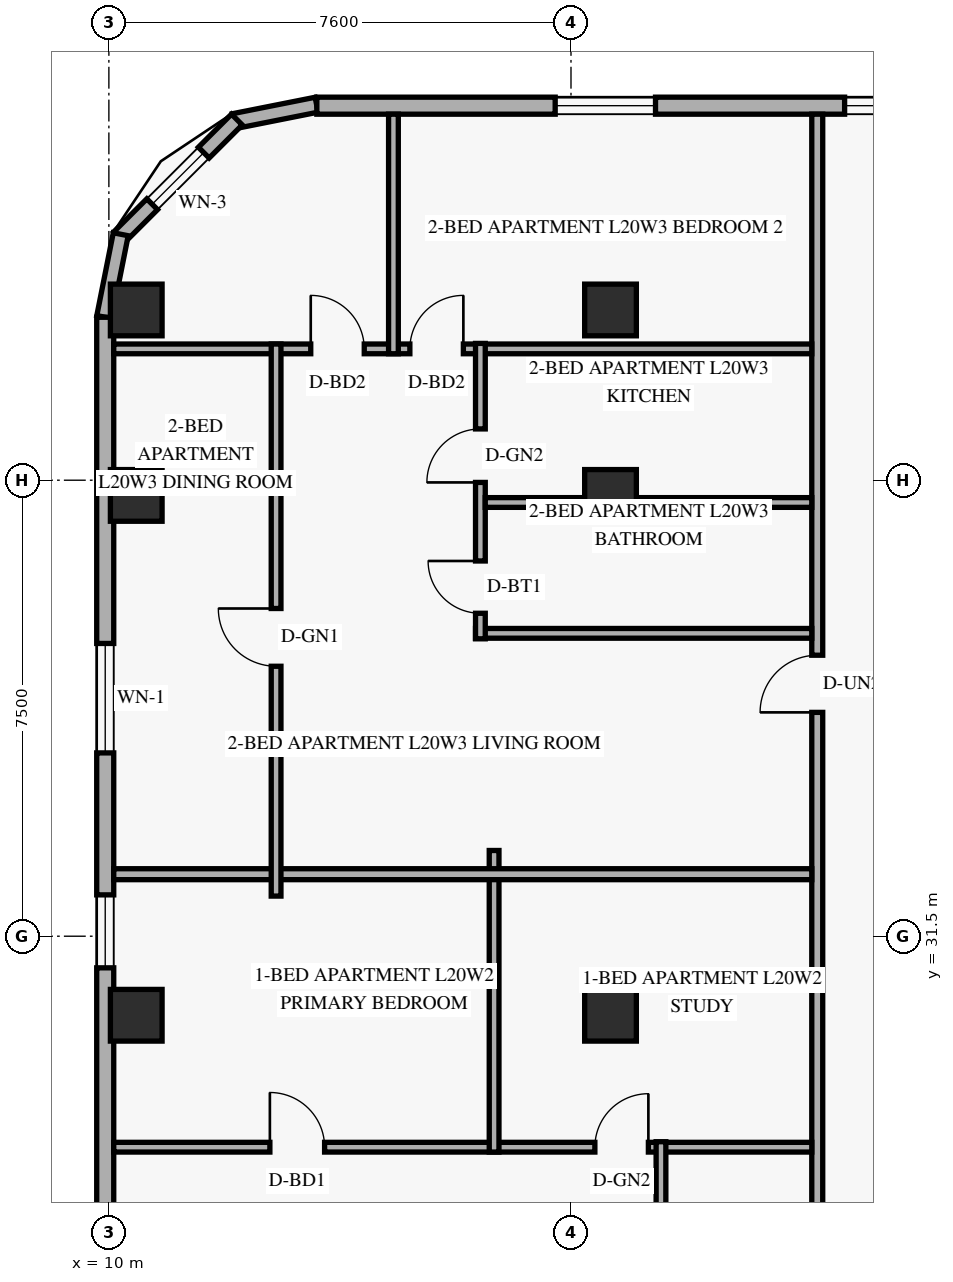
"""IFC4 building model, lengths in metres.
Left out: names, types, materials, properties, quantities, classifications, styles, units other than length and angle.
Written with IfcOpenShell. Run it as: python <this file> out.ifc"""

import sys

from ifc_helpers import new_model, si_unit, direction, frame, frame_2d, origin, origin_2d, place, context, subcontext, project, spatial, rectangle, extrude, element, fill, save


model = new_model("IFC4")
c1 = context("Model", 3, precision=1e-05, world=origin(), true_north=direction((0.0, 1.0)))
c2 = subcontext(c1, "Body", "Model", "MODEL_VIEW")
j1 = project(units=[si_unit("LENGTHUNIT", "METRE"), si_unit("PLANEANGLEUNIT", "RADIAN")], contexts=[c1])
p1 = place(None, origin())
s1 = spatial("IfcSite", under=j1, at=p1, CompositionType="ELEMENT")
p2 = place(p1, origin())
s2 = spatial("IfcBuilding", under=s1, at=p2, CompositionType="ELEMENT")
p3 = place(p2, frame((0.0, 0.0, 80.4)))
s3 = spatial("IfcBuildingStorey", under=s2, at=p3, CompositionType="ELEMENT", Elevation=80.4)
for number, where, z_axis, x_axis in (
    (1, (10.45, 30.2, 0.0), (0.0, 0.0, 1.0), (1.0, 0.0, 0.0)),
    (2, (10.45, 38.75, 0.0), (0.0, 0.0, 1.0), (1.0, 0.0, 0.0)),
    (3, (10.45, 41.8, 0.0), (0.0, 0.0, 1.0), (1.0, 0.0, 0.0)),
    (4, (18.25, 30.2, 0.0), (0.0, 0.0, 1.0), (1.0, 0.0, 0.0)),
    (5, (18.25, 38.75, 0.0), (0.0, 0.0, 1.0), (1.0, 0.0, 0.0)),
    (6, (18.25, 41.8, 0.0), (0.0, 0.0, 1.0), (1.0, 0.0, 0.0)),
):
    element("IfcColumn", number, at=place(p3, frame(where, z_axis=z_axis, x_axis=x_axis)), inside=s3, PredefinedType="COLUMN", context=c2, shape_type="SweptSolid", body=[
        extrude(rectangle(XDim=0.85, YDim=0.85, at=origin_2d()), origin(), (0.0, 0.0, 1.0), 3.6),
    ])
p4 = place(p3, frame((13.417, 45.176, 0.0), z_axis=(0.0, 0.0, 1.0), x_axis=(-0.980809899341, -0.19496651342, 0.0)))
e7 = element("IfcWall", 7, at=p4, inside=s3, PredefinedType="SOLIDWALL", context=c2, shape_type="SweptSolid", body=[
    extrude(rectangle(XDim=1.389, YDim=0.25, at=frame_2d((0.694, 0.0))), origin(), (0.0, 0.0, 1.0), 3.36),
])
p5 = place(p3, frame((12.105, 44.932, 0.0), z_axis=(0.0, 0.0, 1.0), x_axis=(-0.707151344399, -0.707062215165, 0.0)))
e8 = element("IfcWall", 8, at=p5, inside=s3, PredefinedType="SOLIDWALL", context=c2, shape_type="SweptSolid", body=[
    extrude(rectangle(XDim=2.739, YDim=0.25, at=frame_2d((1.37, 0.0))), origin(), (0.0, 0.0, 1.0), 3.36),
])
p6 = place(p5, frame((0.77, 0.0, 0.85)))
e9 = element("IfcOpeningElement", 9, at=p6, cuts=e8, PredefinedType="OPENING", context=c2, shape_type="SweptSolid", body=[
    extrude(rectangle(XDim=1.2, YDim=1.5, at=frame_2d((0.6, 0.75))), frame((0.0, 0.135, 0.0), z_axis=(0.0, -1.0, 0.0), x_axis=(1.0, 0.0, 0.0)), (0.0, 0.0, 1.0), 0.27),
])
p7 = place(p3, frame((10.195, 43.045, 0.0), z_axis=(0.0, 0.0, 1.0), x_axis=(-0.195000137217, -0.980803214965, 0.0)))
e10 = element("IfcWall", 10, at=p7, inside=s3, PredefinedType="SOLIDWALL", context=c2, shape_type="SweptSolid", body=[
    extrude(rectangle(XDim=1.388, YDim=0.25, at=frame_2d((0.694, 0.0))), origin(), (0.0, 0.0, 1.0), 3.36),
])
p8 = place(p3, frame((49.98, 45.16, 0.0), z_axis=(0.0, 0.0, 1.0), x_axis=(-1.0, 0.0, 0.0)))
e11 = element("IfcWall", 11, at=p8, inside=s3, PredefinedType="SOLIDWALL", context=c2, shape_type="SweptSolid", body=[
    extrude(rectangle(XDim=36.56, YDim=0.28, at=frame_2d((18.28, 0.0))), origin(), (0.0, 0.0, 1.0), 3.36),
])
p9 = place(p8, frame((30.99, 0.0, 0.85)))
e12 = element("IfcOpeningElement", 12, at=p9, cuts=e11, PredefinedType="OPENING", context=c2, shape_type="SweptSolid", body=[
    extrude(rectangle(XDim=1.65, YDim=1.6, at=frame_2d((0.825, 0.8))), frame((0.0, 0.15, 0.0), z_axis=(0.0, -1.0, 0.0), x_axis=(1.0, 0.0, 0.0)), (0.0, 0.0, 1.0), 0.3),
])
p10 = place(p8, frame((26.68, 0.0, 0.85)))
e13 = element("IfcOpeningElement", 13, at=p10, cuts=e11, PredefinedType="OPENING", context=c2, shape_type="SweptSolid", body=[
    extrude(rectangle(XDim=1.2, YDim=1.5, at=frame_2d((0.6, 0.75))), frame((0.0, 0.15, 0.0), z_axis=(0.0, -1.0, 0.0), x_axis=(1.0, 0.0, 0.0)), (0.0, 0.0, 1.0), 0.3),
])
p11 = place(p8, frame((22.604, 0.0, 0.85)))
e14 = element("IfcOpeningElement", 14, at=p11, cuts=e11, PredefinedType="OPENING", context=c2, shape_type="SweptSolid", body=[
    extrude(rectangle(XDim=1.65, YDim=1.6, at=frame_2d((0.825, 0.8))), frame((0.0, 0.15, 0.0), z_axis=(0.0, -1.0, 0.0), x_axis=(1.0, 0.0, 0.0)), (0.0, 0.0, 1.0), 0.3),
])
p12 = place(p8, frame((16.769, 0.0, 0.85)))
e15 = element("IfcOpeningElement", 15, at=p12, cuts=e11, PredefinedType="OPENING", context=c2, shape_type="SweptSolid", body=[
    extrude(rectangle(XDim=1.65, YDim=1.6, at=frame_2d((0.825, 0.8))), frame((0.0, 0.15, 0.0), z_axis=(0.0, -1.0, 0.0), x_axis=(1.0, 0.0, 0.0)), (0.0, 0.0, 1.0), 0.3),
])
p13 = place(p8, frame((12.895, 0.0, 0.85)))
e16 = element("IfcOpeningElement", 16, at=p13, cuts=e11, PredefinedType="OPENING", context=c2, shape_type="SweptSolid", body=[
    extrude(rectangle(XDim=1.2, YDim=1.5, at=frame_2d((0.6, 0.75))), frame((0.0, 0.15, 0.0), z_axis=(0.0, -1.0, 0.0), x_axis=(1.0, 0.0, 0.0)), (0.0, 0.0, 1.0), 0.3),
])
p14 = place(p8, frame((7.607, 0.0, 0.85)))
e17 = element("IfcOpeningElement", 17, at=p14, cuts=e11, PredefinedType="OPENING", context=c2, shape_type="SweptSolid", body=[
    extrude(rectangle(XDim=1.65, YDim=1.6, at=frame_2d((0.825, 0.8))), frame((0.0, 0.15, 0.0), z_axis=(0.0, -1.0, 0.0), x_axis=(1.0, 0.0, 0.0)), (0.0, 0.0, 1.0), 0.3),
])
p15 = place(p8, frame((1.393, 0.0, 0.85)))
e18 = element("IfcOpeningElement", 18, at=p15, cuts=e11, PredefinedType="OPENING", context=c2, shape_type="SweptSolid", body=[
    extrude(rectangle(XDim=1.65, YDim=1.6, at=frame_2d((0.825, 0.8))), frame((0.0, 0.15, 0.0), z_axis=(0.0, -1.0, 0.0), x_axis=(1.0, 0.0, 0.0)), (0.0, 0.0, 1.0), 0.3),
])
p16 = place(p3, frame((9.94, 41.68, 0.0), z_axis=(0.0, 0.0, 1.0), x_axis=(0.0, -1.0, 0.0)))
e19 = element("IfcWall", 19, at=p16, inside=s3, PredefinedType="SOLIDWALL", context=c2, shape_type="SweptSolid", body=[
    extrude(rectangle(XDim=35.36, YDim=0.28, at=frame_2d((17.68, 0.0))), origin(), (0.0, 0.0, 1.0), 3.36),
])
p17 = place(p16, frame((27.38, 0.0, 0.85)))
e20 = element("IfcOpeningElement", 20, at=p17, cuts=e19, PredefinedType="OPENING", context=c2, shape_type="SweptSolid", body=[
    extrude(rectangle(XDim=1.8, YDim=1.6, at=frame_2d((0.9, 0.8))), frame((0.0, 0.15, 0.0), z_axis=(0.0, -1.0, 0.0), x_axis=(1.0, 0.0, 0.0)), (0.0, 0.0, 1.0), 0.3),
])
p18 = place(p16, frame((21.131, 0.0, 0.85)))
e21 = element("IfcOpeningElement", 21, at=p18, cuts=e19, PredefinedType="OPENING", context=c2, shape_type="SweptSolid", body=[
    extrude(rectangle(XDim=1.8, YDim=1.6, at=frame_2d((0.9, 0.8))), frame((0.0, 0.15, 0.0), z_axis=(0.0, -1.0, 0.0), x_axis=(1.0, 0.0, 0.0)), (0.0, 0.0, 1.0), 0.3),
])
p19 = place(p16, frame((16.134, 0.0, 0.85)))
e22 = element("IfcOpeningElement", 22, at=p19, cuts=e19, PredefinedType="OPENING", context=c2, shape_type="SweptSolid", body=[
    extrude(rectangle(XDim=1.8, YDim=1.6, at=frame_2d((0.9, 0.8))), frame((0.0, 0.15, 0.0), z_axis=(0.0, -1.0, 0.0), x_axis=(1.0, 0.0, 0.0)), (0.0, 0.0, 1.0), 0.3),
])
p20 = place(p16, frame((9.5, 0.0, 0.85)))
e23 = element("IfcOpeningElement", 23, at=p20, cuts=e19, PredefinedType="OPENING", context=c2, shape_type="SweptSolid", body=[
    extrude(rectangle(XDim=1.2, YDim=1.5, at=frame_2d((0.6, 0.75))), frame((0.0, 0.15, 0.0), z_axis=(0.0, -1.0, 0.0), x_axis=(1.0, 0.0, 0.0)), (0.0, 0.0, 1.0), 0.3),
])
p21 = place(p16, frame((5.365, 0.0, 0.85)))
e24 = element("IfcOpeningElement", 24, at=p21, cuts=e19, PredefinedType="OPENING", context=c2, shape_type="SweptSolid", body=[
    extrude(rectangle(XDim=1.8, YDim=1.6, at=frame_2d((0.9, 0.8))), frame((0.0, 0.15, 0.0), z_axis=(0.0, -1.0, 0.0), x_axis=(1.0, 0.0, 0.0)), (0.0, 0.0, 1.0), 0.3),
])
p22 = place(p3, frame((21.65, 2.98, 0.0), z_axis=(0.0, 0.0, 1.0), x_axis=(0.0, 1.0, 0.0)))
e25 = element("IfcWall", 25, at=p22, inside=s3, PredefinedType="STANDARD", context=c2, shape_type="SweptSolid", body=[
    extrude(rectangle(XDim=42.04, YDim=0.18, at=frame_2d((21.02, 0.0))), origin(), (0.0, 0.0, 1.0), 2.731),
])
p23 = place(p22, frame((9.116, 0.0, 0.0)))
e26 = element("IfcOpeningElement", 26, at=p23, cuts=e25, PredefinedType="OPENING", context=c2, shape_type="SweptSolid", body=[
    extrude(rectangle(XDim=0.94, YDim=2.15, at=frame_2d((0.47, 1.075))), frame((0.0, 0.1, 0.0), z_axis=(0.0, -1.0, 0.0), x_axis=(1.0, 0.0, 0.0)), (0.0, 0.0, 1.0), 0.2),
])
p24 = place(p22, frame((19.1, 0.0, 0.0)))
e27 = element("IfcOpeningElement", 27, at=p24, cuts=e25, PredefinedType="OPENING", context=c2, shape_type="SweptSolid", body=[
    extrude(rectangle(XDim=0.94, YDim=2.15, at=frame_2d((0.47, 1.075))), frame((0.0, 0.1, 0.0), z_axis=(0.0, -1.0, 0.0), x_axis=(1.0, 0.0, 0.0)), (0.0, 0.0, 1.0), 0.2),
])
p25 = place(p22, frame((32.201, 0.0, 0.0)))
e28 = element("IfcOpeningElement", 28, at=p25, cuts=e25, PredefinedType="OPENING", context=c2, shape_type="SweptSolid", body=[
    extrude(rectangle(XDim=0.94, YDim=2.15, at=frame_2d((0.47, 1.075))), frame((0.0, 0.1, 0.0), z_axis=(0.0, -1.0, 0.0), x_axis=(1.0, 0.0, 0.0)), (0.0, 0.0, 1.0), 0.2),
])
p26 = place(p3, frame((10.08, 28.03, 0.0), z_axis=(0.0, 0.0, 1.0), x_axis=(1.0, 0.0, 0.0)))
e29 = element("IfcWall", 29, at=p26, inside=s3, PredefinedType="PARTITIONING", context=c2, shape_type="SweptSolid", body=[
    extrude(rectangle(XDim=11.48, YDim=0.16, at=frame_2d((5.74, 0.0))), origin(), (0.0, 0.0, 1.0), 2.731),
])
p27 = place(p26, frame((7.913, 0.0, 0.0)))
e30 = element("IfcOpeningElement", 30, at=p27, cuts=e29, PredefinedType="OPENING", context=c2, shape_type="SweptSolid", body=[
    extrude(rectangle(XDim=0.88, YDim=2.12, at=frame_2d((0.44, 1.06))), frame((0.0, 0.09, 0.0), z_axis=(0.0, -1.0, 0.0), x_axis=(1.0, 0.0, 0.0)), (0.0, 0.0, 1.0), 0.18),
])
p28 = place(p26, frame((2.568, 0.0, 0.0)))
e31 = element("IfcOpeningElement", 31, at=p28, cuts=e29, PredefinedType="OPENING", context=c2, shape_type="SweptSolid", body=[
    extrude(rectangle(XDim=0.9, YDim=2.14, at=frame_2d((0.45, 1.07))), frame((0.0, 0.09, 0.0), z_axis=(0.0, -1.0, 0.0), x_axis=(1.0, 0.0, 0.0)), (0.0, 0.0, 1.0), 0.18),
])
p29 = place(p3, frame((19.08, 23.29, 0.0), z_axis=(0.0, 0.0, 1.0), x_axis=(0.0, 1.0, 0.0)))
e32 = element("IfcWall", 32, at=p29, inside=s3, PredefinedType="PLUMBINGWALL", context=c2, shape_type="SweptSolid", body=[
    extrude(rectangle(XDim=4.83, YDim=0.16, at=frame_2d((2.415, 0.0))), origin(), (0.0, 0.0, 1.0), 3.36),
])
p30 = place(p29, frame((0.42, 0.0, 0.0)))
e33 = element("IfcOpeningElement", 33, at=p30, cuts=e32, PredefinedType="OPENING", context=c2, shape_type="SweptSolid", body=[
    extrude(rectangle(XDim=0.86, YDim=2.12, at=frame_2d((0.43, 1.06))), frame((0.0, 0.09, 0.0), z_axis=(0.0, -1.0, 0.0), x_axis=(1.0, 0.0, 0.0)), (0.0, 0.0, 1.0), 0.18),
])
p31 = place(p29, frame((2.559, 0.0, 0.0)))
e34 = element("IfcOpeningElement", 34, at=p31, cuts=e32, PredefinedType="OPENING", context=c2, shape_type="SweptSolid", body=[
    extrude(rectangle(XDim=0.88, YDim=2.12, at=frame_2d((0.44, 1.06))), frame((0.0, 0.09, 0.0), z_axis=(0.0, -1.0, 0.0), x_axis=(1.0, 0.0, 0.0)), (0.0, 0.0, 1.0), 0.18),
])
p32 = place(p3, frame((16.335, 27.95, 0.0), z_axis=(0.0, 0.0, 1.0), x_axis=(0.0, 1.0, 0.0)))
e35 = element("IfcWall", 35, at=p32, inside=s3, PredefinedType="PARTITIONING", context=c2, shape_type="SweptSolid", body=[
    extrude(rectangle(XDim=4.96, YDim=0.16, at=frame_2d((2.48, 0.0))), origin(), (0.0, 0.0, 1.0), 2.731),
])
p33 = place(p3, frame((10.08, 32.52, 0.0), z_axis=(0.0, 0.0, 1.0), x_axis=(1.0, 0.0, 0.0)))
e36 = element("IfcWall", 36, at=p33, inside=s3, PredefinedType="PARTITIONING", context=c2, shape_type="SweptSolid", body=[
    extrude(rectangle(XDim=11.48, YDim=0.18, at=frame_2d((5.74, 0.0))), origin(), (0.0, 0.0, 1.0), 2.731),
])
p34 = place(p3, frame((10.08, 41.16, 0.0), z_axis=(0.0, 0.0, 1.0), x_axis=(1.0, 0.0, 0.0)))
e37 = element("IfcWall", 37, at=p34, inside=s3, PredefinedType="PARTITIONING", context=c2, shape_type="SweptSolid", body=[
    extrude(rectangle(XDim=11.48, YDim=0.16, at=frame_2d((5.74, 0.0))), origin(), (0.0, 0.0, 1.0), 2.731),
])
p35 = place(p34, frame((3.24, 0.0, 0.0)))
e38 = element("IfcOpeningElement", 38, at=p35, cuts=e37, PredefinedType="OPENING", context=c2, shape_type="SweptSolid", body=[
    extrude(rectangle(XDim=0.88, YDim=2.14, at=frame_2d((0.44, 1.07))), frame((0.0, 0.09, 0.0), z_axis=(0.0, -1.0, 0.0), x_axis=(1.0, 0.0, 0.0)), (0.0, 0.0, 1.0), 0.18),
])
p36 = place(p34, frame((4.87, 0.0, 0.0)))
e39 = element("IfcOpeningElement", 39, at=p36, cuts=e37, PredefinedType="OPENING", context=c2, shape_type="SweptSolid", body=[
    extrude(rectangle(XDim=0.88, YDim=2.14, at=frame_2d((0.44, 1.07))), frame((0.0, 0.09, 0.0), z_axis=(0.0, -1.0, 0.0), x_axis=(1.0, 0.0, 0.0)), (0.0, 0.0, 1.0), 0.18),
])
p37 = place(p3, frame((16.03, 36.481, 0.0), z_axis=(0.0, 0.0, 1.0), x_axis=(1.0, 0.0, 0.0)))
e40 = element("IfcWall", 40, at=p37, inside=s3, PredefinedType="PLUMBINGWALL", context=c2, shape_type="SweptSolid", body=[
    extrude(rectangle(XDim=5.53, YDim=0.16, at=frame_2d((2.765, 0.0))), origin(), (0.0, 0.0, 1.0), 2.731),
])
p38 = place(p3, frame((16.11, 36.392, 0.0), z_axis=(0.0, 0.0, 1.0), x_axis=(0.0, 1.0, 0.0)))
e41 = element("IfcWall", 41, at=p38, inside=s3, PredefinedType="PLUMBINGWALL", context=c2, shape_type="SweptSolid", body=[
    extrude(rectangle(XDim=4.858, YDim=0.16, at=frame_2d((2.429, 0.0))), origin(), (0.0, 0.0, 1.0), 2.731),
])
p39 = place(p38, frame((0.42, 0.0, 0.0)))
e42 = element("IfcOpeningElement", 42, at=p39, cuts=e41, PredefinedType="OPENING", context=c2, shape_type="SweptSolid", body=[
    extrude(rectangle(XDim=0.86, YDim=2.12, at=frame_2d((0.43, 1.06))), frame((0.0, 0.09, 0.0), z_axis=(0.0, -1.0, 0.0), x_axis=(1.0, 0.0, 0.0)), (0.0, 0.0, 1.0), 0.18),
])
p40 = place(p38, frame((2.572, 0.0, 0.0)))
e43 = element("IfcOpeningElement", 43, at=p40, cuts=e41, PredefinedType="OPENING", context=c2, shape_type="SweptSolid", body=[
    extrude(rectangle(XDim=0.88, YDim=2.12, at=frame_2d((0.44, 1.06))), frame((0.0, 0.09, 0.0), z_axis=(0.0, -1.0, 0.0), x_axis=(1.0, 0.0, 0.0)), (0.0, 0.0, 1.0), 0.18),
])
p41 = place(p3, frame((16.19, 38.634, 0.0), z_axis=(0.0, 0.0, 1.0), x_axis=(1.0, 0.0, 0.0)))
e44 = element("IfcWall", 44, at=p41, inside=s3, PredefinedType="PLUMBINGWALL", context=c2, shape_type="SweptSolid", body=[
    extrude(rectangle(XDim=5.37, YDim=0.16, at=frame_2d((2.685, 0.0))), origin(), (0.0, 0.0, 1.0), 2.731),
])
p42 = place(p3, frame((12.75, 32.16, 0.0), z_axis=(0.0, 0.0, 1.0), x_axis=(0.0, 1.0, 0.0)))
e45 = element("IfcWall", 45, at=p42, inside=s3, PredefinedType="PARTITIONING", context=c2, shape_type="SweptSolid", body=[
    extrude(rectangle(XDim=9.08, YDim=0.16, at=frame_2d((4.54, 0.0))), origin(), (0.0, 0.0, 1.0), 2.731),
])
p43 = place(p42, frame((3.78, 0.0, 0.0)))
e46 = element("IfcOpeningElement", 46, at=p43, cuts=e45, PredefinedType="OPENING", context=c2, shape_type="SweptSolid", body=[
    extrude(rectangle(XDim=0.95, YDim=2.15, at=frame_2d((0.475, 1.075))), frame((0.0, 0.09, 0.0), z_axis=(0.0, -1.0, 0.0), x_axis=(1.0, 0.0, 0.0)), (0.0, 0.0, 1.0), 0.18),
])
p44 = place(p3, frame((14.68, 41.08, 0.0), z_axis=(0.0, 0.0, 1.0), x_axis=(0.0, 1.0, 0.0)))
e47 = element("IfcWall", 47, at=p44, inside=s3, PredefinedType="PARTITIONING", context=c2, shape_type="SweptSolid", body=[
    extrude(rectangle(XDim=3.94, YDim=0.16, at=frame_2d((1.97, 0.0))), origin(), (0.0, 0.0, 1.0), 2.809),
])
p45 = place(p6, origin())
e48 = element("IfcWindow", 48, at=p45, inside=s3, PartitioningType="SINGLE_PANEL", PredefinedType="WINDOW", context=c2, shape_type="SweptSolid", body=[
    extrude(rectangle(XDim=1.2, YDim=1.5, at=frame_2d((0.6, 0.75))), frame((0.0, 0.03, 0.0), z_axis=(0.0, -1.0, 0.0), x_axis=(1.0, 0.0, 0.0)), (0.0, 0.0, 1.0), 0.06),
])
fill(e9, e48)
p46 = place(p9, origin())
e49 = element("IfcWindow", 49, at=p46, inside=s3, PartitioningType="SINGLE_PANEL", PredefinedType="WINDOW", context=c2, shape_type="SweptSolid", body=[
    extrude(rectangle(XDim=1.65, YDim=1.6, at=frame_2d((0.825, 0.8))), frame((0.0, 0.03, 0.0), z_axis=(0.0, -1.0, 0.0), x_axis=(1.0, 0.0, 0.0)), (0.0, 0.0, 1.0), 0.06),
])
fill(e12, e49)
p47 = place(p10, origin())
e50 = element("IfcWindow", 50, at=p47, inside=s3, PartitioningType="SINGLE_PANEL", PredefinedType="WINDOW", context=c2, shape_type="SweptSolid", body=[
    extrude(rectangle(XDim=1.2, YDim=1.5, at=frame_2d((0.6, 0.75))), frame((0.0, 0.03, 0.0), z_axis=(0.0, -1.0, 0.0), x_axis=(1.0, 0.0, 0.0)), (0.0, 0.0, 1.0), 0.06),
])
fill(e13, e50)
p48 = place(p20, origin())
e51 = element("IfcWindow", 51, at=p48, inside=s3, PartitioningType="SINGLE_PANEL", PredefinedType="WINDOW", context=c2, shape_type="SweptSolid", body=[
    extrude(rectangle(XDim=1.2, YDim=1.5, at=frame_2d((0.6, 0.75))), frame((0.0, 0.03, 0.0), z_axis=(0.0, -1.0, 0.0), x_axis=(1.0, 0.0, 0.0)), (0.0, 0.0, 1.0), 0.06),
])
fill(e23, e51)
p49 = place(p21, origin())
e52 = element("IfcWindow", 52, at=p49, inside=s3, PartitioningType="SINGLE_PANEL", PredefinedType="WINDOW", context=c2, shape_type="SweptSolid", body=[
    extrude(rectangle(XDim=1.8, YDim=1.6, at=frame_2d((0.9, 0.8))), frame((0.0, 0.03, 0.0), z_axis=(0.0, -1.0, 0.0), x_axis=(1.0, 0.0, 0.0)), (0.0, 0.0, 1.0), 0.06),
])
fill(e24, e52)
p50 = place(p27, origin())
e53 = element("IfcDoor", 53, at=p50, inside=s3, OperationType="SINGLE_SWING_RIGHT", PredefinedType="DOOR", context=c2, shape_type="SweptSolid", body=[
    extrude(rectangle(XDim=0.88, YDim=2.12, at=frame_2d((0.44, 1.06))), frame((0.0, 0.025, 0.0), z_axis=(0.0, -1.0, 0.0), x_axis=(1.0, 0.0, 0.0)), (0.0, 0.0, 1.0), 0.05),
])
fill(e30, e53)
p51 = place(p28, origin())
e54 = element("IfcDoor", 54, at=p51, inside=s3, OperationType="SINGLE_SWING_LEFT", PredefinedType="DOOR", context=c2, shape_type="SweptSolid", body=[
    extrude(rectangle(XDim=0.9, YDim=2.14, at=frame_2d((0.45, 1.07))), frame((0.0, 0.025, 0.0), z_axis=(0.0, -1.0, 0.0), x_axis=(1.0, 0.0, 0.0)), (0.0, 0.0, 1.0), 0.05),
])
fill(e31, e54)
p52 = place(p43, origin())
e55 = element("IfcDoor", 55, at=p52, inside=s3, OperationType="SINGLE_SWING_RIGHT", PredefinedType="DOOR", context=c2, shape_type="SweptSolid", body=[
    extrude(rectangle(XDim=0.95, YDim=2.15, at=frame_2d((0.475, 1.075))), frame((0.0, 0.025, 0.0), z_axis=(0.0, -1.0, 0.0), x_axis=(1.0, 0.0, 0.0)), (0.0, 0.0, 1.0), 0.05),
])
fill(e46, e55)
p53 = place(p25, origin())
e56 = element("IfcDoor", 56, at=p53, inside=s3, OperationType="SINGLE_SWING_LEFT", PredefinedType="DOOR", context=c2, shape_type="SweptSolid", body=[
    extrude(rectangle(XDim=0.94, YDim=2.15, at=frame_2d((0.47, 1.075))), frame((0.0, 0.025, 0.0), z_axis=(0.0, -1.0, 0.0), x_axis=(1.0, 0.0, 0.0)), (0.0, 0.0, 1.0), 0.05),
])
fill(e28, e56)
p54 = place(p39, origin())
e57 = element("IfcDoor", 57, at=p54, inside=s3, OperationType="SINGLE_SWING_RIGHT", PredefinedType="DOOR", context=c2, shape_type="SweptSolid", body=[
    extrude(rectangle(XDim=0.86, YDim=2.12, at=frame_2d((0.43, 1.06))), frame((0.0, 0.025, 0.0), z_axis=(0.0, -1.0, 0.0), x_axis=(1.0, 0.0, 0.0)), (0.0, 0.0, 1.0), 0.05),
])
fill(e42, e57)
p55 = place(p40, origin())
e58 = element("IfcDoor", 58, at=p55, inside=s3, OperationType="SINGLE_SWING_LEFT", PredefinedType="DOOR", context=c2, shape_type="SweptSolid", body=[
    extrude(rectangle(XDim=0.88, YDim=2.12, at=frame_2d((0.44, 1.06))), frame((0.0, 0.025, 0.0), z_axis=(0.0, -1.0, 0.0), x_axis=(1.0, 0.0, 0.0)), (0.0, 0.0, 1.0), 0.05),
])
fill(e43, e58)
p56 = place(p35, origin())
e59 = element("IfcDoor", 59, at=p56, inside=s3, OperationType="SINGLE_SWING_LEFT", PredefinedType="DOOR", context=c2, shape_type="SweptSolid", body=[
    extrude(rectangle(XDim=0.88, YDim=2.14, at=frame_2d((0.44, 1.07))), frame((0.0, 0.025, 0.0), z_axis=(0.0, -1.0, 0.0), x_axis=(1.0, 0.0, 0.0)), (0.0, 0.0, 1.0), 0.05),
])
fill(e38, e59)
p57 = place(p36, origin())
e60 = element("IfcDoor", 60, at=p57, inside=s3, OperationType="SINGLE_SWING_RIGHT", PredefinedType="DOOR", context=c2, shape_type="SweptSolid", body=[
    extrude(rectangle(XDim=0.88, YDim=2.14, at=frame_2d((0.44, 1.07))), frame((0.0, 0.025, 0.0), z_axis=(0.0, -1.0, 0.0), x_axis=(1.0, 0.0, 0.0)), (0.0, 0.0, 1.0), 0.05),
])
fill(e39, e60)
save(model, sys.argv[1])
